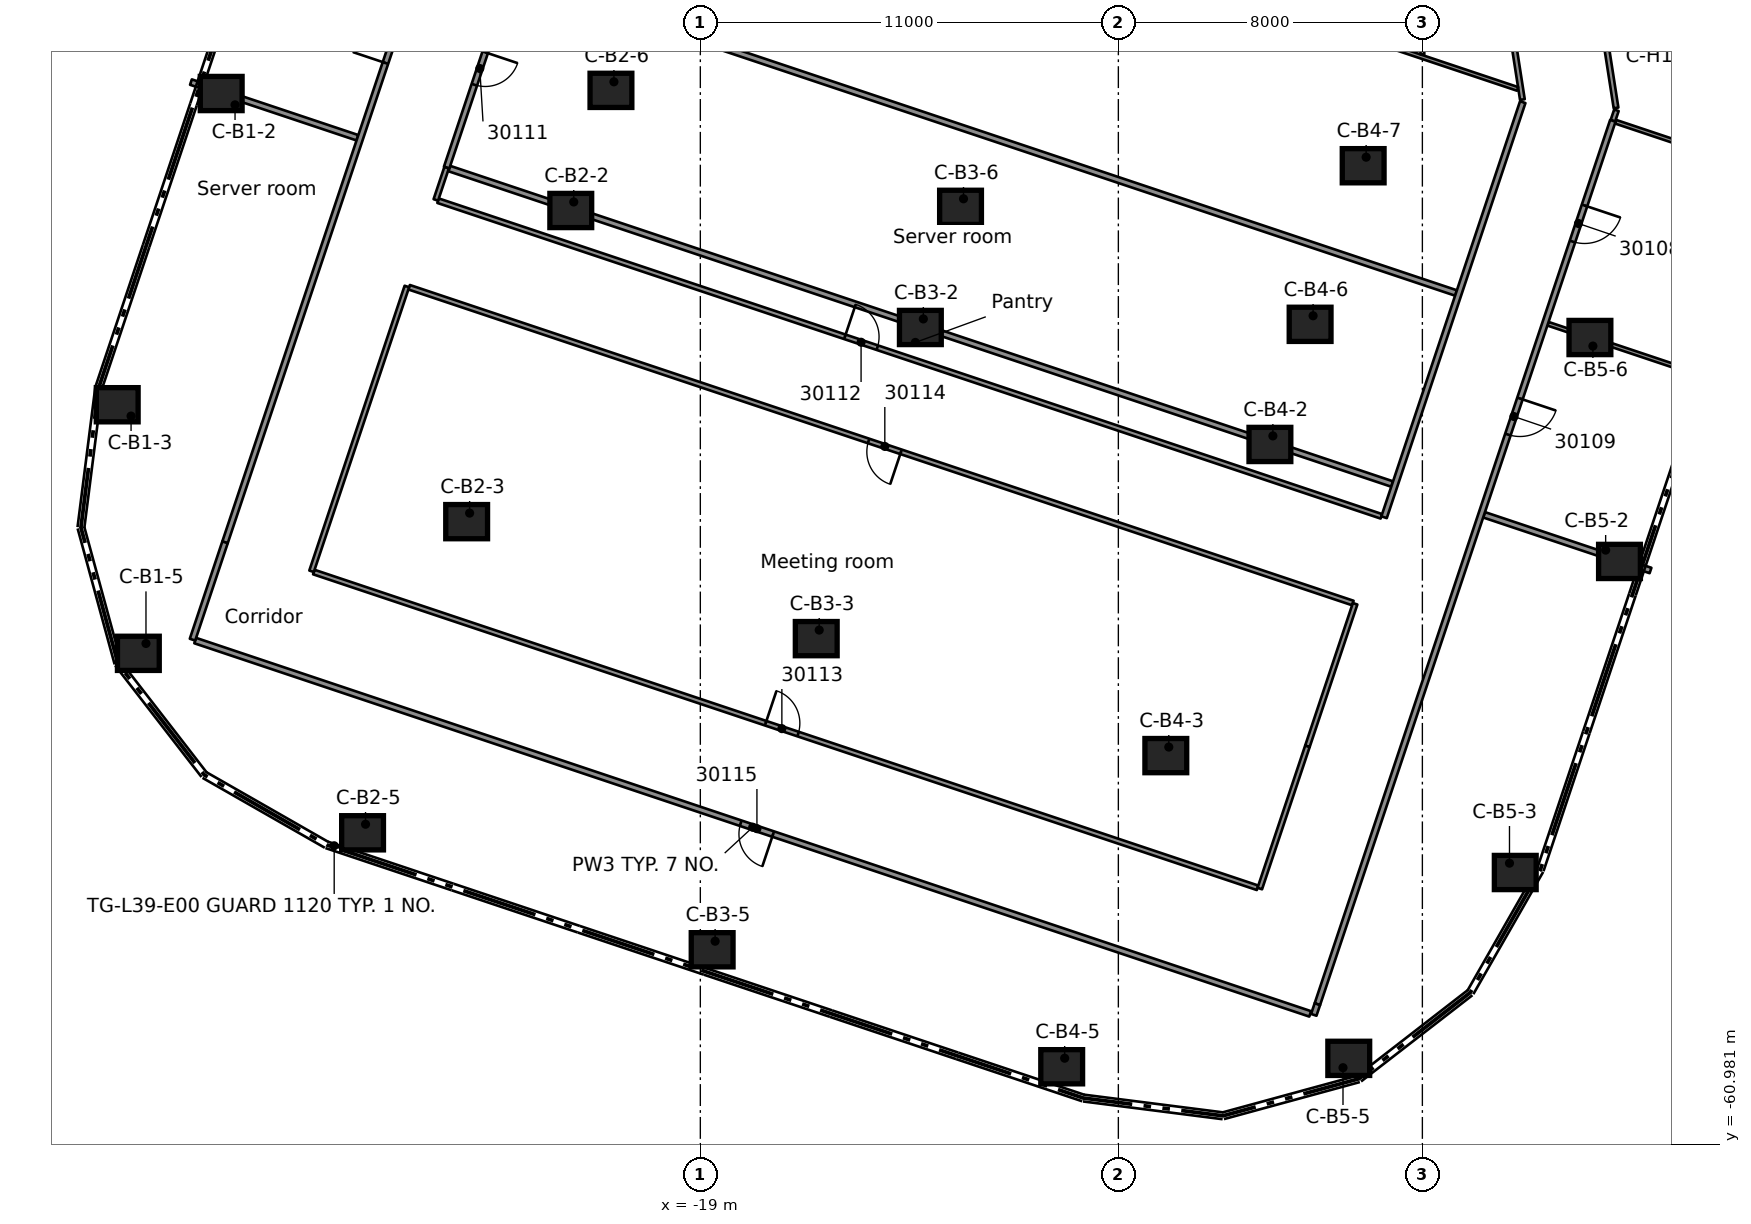
"""IFC4 building model, lengths in metres.
Left out: names, types, materials, properties, quantities, classifications, styles, units other than length and angle.
Written with IfcOpenShell. Run it as: python <this file> out.ifc"""

import sys

from ifc_helpers import new_model, si_unit, direction, frame, frame_2d, origin, origin_2d, place, context, subcontext, project, spatial, rectangle, extrude, element, fill, save


model = new_model("IFC4")
c1 = context("Model", 3, precision=1e-05, world=origin(), true_north=direction((0.0, 1.0)))
c2 = subcontext(c1, "Body", "Model", "MODEL_VIEW")
j1 = project(units=[si_unit("LENGTHUNIT", "METRE"), si_unit("PLANEANGLEUNIT", "RADIAN")], contexts=[c1])
p1 = place(None, origin())
s1 = spatial("IfcSite", under=j1, at=p1, CompositionType="ELEMENT")
p2 = place(p1, origin())
s2 = spatial("IfcBuilding", under=s1, at=p2, CompositionType="ELEMENT")
p3 = place(p2, frame((0.0, 0.0, 152.6)))
s3 = spatial("IfcBuildingStorey", under=s2, at=p3, CompositionType="ELEMENT", Elevation=152.6)
for number, where, z_axis, x_axis in (
    (1, (-31.608, -33.326, 0.0), (0.0, 0.0, 1.0), (1.0, 0.0, 0.0)),
    (2, (-34.344, -41.515, 0.0), (0.0, 0.0, 1.0), (1.0, 0.0, 0.0)),
    (3, (-33.788, -48.056, 0.0), (0.0, 0.0, 1.0), (1.0, 0.0, 0.0)),
    (4, (-22.409, -36.404, 0.0), (0.0, 0.0, 1.0), (1.0, 0.0, 0.0)),
    (5, (-25.149, -44.591, 0.0), (0.0, 0.0, 1.0), (1.0, 0.0, 0.0)),
    (6, (-27.888, -52.778, 0.0), (0.0, 0.0, 1.0), (1.0, 0.0, 0.0)),
    (7, (-21.352, -33.243, 0.0), (0.0, 0.0, 1.0), (1.0, 0.0, 0.0)),
    (8, (-13.21, -39.482, 0.0), (0.0, 0.0, 1.0), (1.0, 0.0, 0.0)),
    (9, (-15.95, -47.669, 0.0), (0.0, 0.0, 1.0), (1.0, 0.0, 0.0)),
    (10, (-18.689, -55.856, 0.0), (0.0, 0.0, 1.0), (1.0, 0.0, 0.0)),
    (11, (-12.153, -36.321, 0.0), (0.0, 0.0, 1.0), (1.0, 0.0, 0.0)),
    (12, (-4.012, -42.56, 0.0), (0.0, 0.0, 1.0), (1.0, 0.0, 0.0)),
    (13, (-6.751, -50.747, 0.0), (0.0, 0.0, 1.0), (1.0, 0.0, 0.0)),
    (14, (-9.491, -58.934, 0.0), (0.0, 0.0, 1.0), (1.0, 0.0, 0.0)),
    (15, (-2.954, -39.399, 0.0), (0.0, 0.0, 1.0), (1.0, 0.0, 0.0)),
    (16, (-1.558, -35.226, 0.0), (0.0, 0.0, 1.0), (1.0, 0.0, 0.0)),
    (17, (5.187, -45.638, 0.0), (0.0, 0.0, 1.0), (1.0, 0.0, 0.0)),
    (18, (2.444, -53.823, 0.0), (0.0, 0.0, 1.0), (1.0, 0.0, 0.0)),
    (19, (-1.937, -58.713, 0.0), (0.0, 0.0, 1.0), (1.0, 0.0, 0.0)),
    (20, (4.409, -39.746, 0.0), (0.0, 0.0, 1.0), (1.0, 0.0, 0.0)),
):
    element("IfcColumn", number, at=place(p3, frame(where, z_axis=z_axis, x_axis=x_axis)), inside=s3, PredefinedType="COLUMN", context=c2, shape_type="SweptSolid", body=[
        extrude(rectangle(XDim=1.1, YDim=0.9, at=origin_2d()), origin(), (0.0, 0.0, 1.0), 3.5),
    ])
p4 = place(p3, frame((2.632, -33.485, 0.0), z_axis=(0.0, 0.0, 1.0), x_axis=(-0.153927089286, 0.988082208717, 0.0)))
e21 = element("IfcWall", 21, at=p4, inside=s3, PredefinedType="PARTITIONING", context=c2, shape_type="SweptSolid", body=[
    extrude(rectangle(XDim=4.405, YDim=0.125, at=frame_2d((2.202, 0.0))), origin(), (0.0, 0.0, 1.0), 3.08),
])
p5 = place(p3, frame((4.394, -29.196, 0.0), z_axis=(0.0, 0.0, 1.0), x_axis=(0.153813799922, -0.9880998507, 0.0)))
e22 = element("IfcWall", 22, at=p5, inside=s3, PredefinedType="PARTITIONING", context=c2, shape_type="SweptSolid", body=[
    extrude(rectangle(XDim=4.563, YDim=0.125, at=frame_2d((2.282, 0.0))), origin(), (0.0, 0.0, 1.0), 3.08),
])
p6 = place(p3, frame((-2.952, -57.543, 0.0), z_axis=(0.0, 0.0, 1.0), x_axis=(-0.948265852258, 0.317477358942, 0.0)))
e23 = element("IfcWall", 23, at=p6, inside=s3, PredefinedType="PARTITIONING", context=c2, shape_type="SweptSolid", body=[
    extrude(rectangle(XDim=30.941, YDim=0.15, at=frame_2d((15.47, 0.0))), origin(), (0.0, 0.0, 1.0), 3.08),
])
p7 = place(p6, frame((14.903, 0.0, 0.0)))
e24 = element("IfcOpeningElement", 24, at=p7, cuts=e23, PredefinedType="OPENING", context=c2, shape_type="SweptSolid", body=[
    extrude(rectangle(XDim=0.9, YDim=2.1, at=frame_2d((0.45, 1.05))), frame((0.0, 0.085, 0.0), z_axis=(0.0, -1.0, 0.0), x_axis=(1.0, 0.0, 0.0)), (0.0, 0.0, 1.0), 0.17),
])
p8 = place(p3, frame((-29.171, -45.917, 0.0), z_axis=(0.0, 0.0, 1.0), x_axis=(0.948337781815, -0.317262433299, 0.0)))
e25 = element("IfcWall", 25, at=p8, inside=s3, PredefinedType="PARTITIONING", context=c2, shape_type="SweptSolid", body=[
    extrude(rectangle(XDim=26.187, YDim=0.125, at=frame_2d((13.093, 0.0))), origin(), (0.0, 0.0, 1.0), 3.08),
])
p9 = place(p8, frame((12.538, 0.0, 0.0)))
e26 = element("IfcOpeningElement", 26, at=p9, cuts=e25, PredefinedType="OPENING", context=c2, shape_type="SweptSolid", body=[
    extrude(rectangle(XDim=0.9, YDim=2.1, at=frame_2d((0.45, 1.05))), frame((0.0, 0.073, 0.0), z_axis=(0.0, -1.0, 0.0), x_axis=(1.0, 0.0, 0.0)), (0.0, 0.0, 1.0), 0.145),
])
p10 = place(p3, frame((-1.829, -46.732, 0.0), z_axis=(0.0, 0.0, 1.0), x_axis=(-0.948329366448, 0.317287586791, 0.0)))
e27 = element("IfcWall", 27, at=p10, inside=s3, PredefinedType="PARTITIONING", context=c2, shape_type="SweptSolid", body=[
    extrude(rectangle(XDim=26.187, YDim=0.125, at=frame_2d((13.094, 0.0))), origin(), (0.0, 0.0, 1.0), 3.08),
])
p11 = place(p10, frame((12.538, 0.0, 0.0)))
e28 = element("IfcOpeningElement", 28, at=p11, cuts=e27, PredefinedType="OPENING", context=c2, shape_type="SweptSolid", body=[
    extrude(rectangle(XDim=0.9, YDim=2.1, at=frame_2d((0.45, 1.05))), frame((0.0, 0.073, 0.0), z_axis=(0.0, -1.0, 0.0), x_axis=(1.0, 0.0, 0.0)), (0.0, 0.0, 1.0), 0.145),
])
p12 = place(p3, frame((-25.901, -36.146, 0.0), z_axis=(0.0, 0.0, 1.0), x_axis=(0.948327321089, -0.317293700025, 0.0)))
e29 = element("IfcWall", 29, at=p12, inside=s3, PredefinedType="PARTITIONING", context=c2, shape_type="SweptSolid", body=[
    extrude(rectangle(XDim=26.174, YDim=0.125, at=frame_2d((13.087, 0.0))), origin(), (0.0, 0.0, 1.0), 3.08),
])
p13 = place(p12, frame((11.288, 0.0, 0.0)))
e30 = element("IfcOpeningElement", 30, at=p13, cuts=e29, PredefinedType="OPENING", context=c2, shape_type="SweptSolid", body=[
    extrude(rectangle(XDim=0.9, YDim=2.1, at=frame_2d((0.45, 1.05))), frame((0.0, 0.073, 0.0), z_axis=(0.0, -1.0, 0.0), x_axis=(1.0, 0.0, 0.0)), (0.0, 0.0, 1.0), 0.145),
])
p14 = place(p3, frame((-32.404, -33.025, 0.0), z_axis=(0.0, 0.0, 1.0), x_axis=(0.948376327841, -0.317147191049, 0.0)))
e31 = element("IfcWall", 31, at=p14, inside=s3, PredefinedType="PARTITIONING", context=c2, shape_type="SweptSolid", body=[
    extrude(rectangle(XDim=4.62, YDim=0.15, at=frame_2d((2.31, 0.0))), origin(), (0.0, 0.0, 1.0), 3.08),
])
p15 = place(p3, frame((-25.605, -35.3, 0.0), z_axis=(0.0, 0.0, 1.0), x_axis=(0.948327152728, -0.317294203223, 0.0)))
e32 = element("IfcWall", 32, at=p15, inside=s3, PredefinedType="PARTITIONING", context=c2, shape_type="SweptSolid", body=[
    extrude(rectangle(XDim=26.162, YDim=0.15, at=frame_2d((13.081, 0.0))), origin(), (0.0, 0.0, 1.0), 3.08),
])
p16 = place(p3, frame((1.624, -44.411, 0.0), z_axis=(0.0, 0.0, 1.0), x_axis=(0.948328454315, -0.317290313021, 0.0)))
e33 = element("IfcWall", 33, at=p16, inside=s3, PredefinedType="PARTITIONING", context=c2, shape_type="SweptSolid", body=[
    extrude(rectangle(XDim=4.617, YDim=0.15, at=frame_2d((2.309, 0.0))), origin(), (0.0, 0.0, 1.0), 3.08),
])
p17 = place(p3, frame((-23.923, -30.274, 0.0), z_axis=(0.0, 0.0, 1.0), x_axis=(0.948327152728, -0.317294203223, 0.0)))
e34 = element("IfcWall", 34, at=p17, inside=s3, PredefinedType="PARTITIONING", context=c2, shape_type="SweptSolid", body=[
    extrude(rectangle(XDim=26.162, YDim=0.15, at=frame_2d((13.081, 0.0))), origin(), (0.0, 0.0, 1.0), 3.08),
])
p18 = place(p3, frame((3.306, -39.384, 0.0), z_axis=(0.0, 0.0, 1.0), x_axis=(0.948270131157, -0.317464578112, 0.0)))
e35 = element("IfcWall", 35, at=p18, inside=s3, PredefinedType="PARTITIONING", context=c2, shape_type="SweptSolid", body=[
    extrude(rectangle(XDim=4.618, YDim=0.1, at=frame_2d((2.309, 0.0))), origin(), (0.0, 0.0, 1.0), 3.08),
])
p19 = place(p3, frame((-21.98, -25.012, 0.0), z_axis=(0.0, 0.0, 1.0), x_axis=(0.948316725504, -0.31732536635, 0.0)))
e36 = element("IfcWall", 36, at=p19, inside=s3, PredefinedType="PARTITIONING", context=c2, shape_type="SweptSolid", body=[
    extrude(rectangle(XDim=25.819, YDim=0.1, at=frame_2d((12.91, 0.0))), origin(), (0.0, 0.0, 1.0), 3.08),
])
p20 = place(p3, frame((5.084, -34.068, 0.0), z_axis=(0.0, 0.0, 1.0), x_axis=(0.948370959481, -0.317163243793, 0.0)))
e37 = element("IfcWall", 37, at=p20, inside=s3, PredefinedType="PARTITIONING", context=c2, shape_type="SweptSolid", body=[
    extrude(rectangle(XDim=4.619, YDim=0.1, at=frame_2d((2.309, 0.0))), origin(), (0.0, 0.0, 1.0), 3.08),
])
p21 = place(p3, frame((-2.858, -57.568, 0.0), z_axis=(0.0, 0.0, 1.0), x_axis=(0.319888251559, 0.947455279427, 0.0)))
e38 = element("IfcWall", 38, at=p21, inside=s3, PredefinedType="PARTITIONING", context=c2, shape_type="SweptSolid", body=[
    extrude(rectangle(XDim=0.3, YDim=0.15, at=frame_2d((0.15, 0.0))), origin(), (0.0, 0.0, 1.0), 3.08),
])
p22 = place(p3, frame((5.013, -34.044, 0.0), z_axis=(0.0, 0.0, 1.0), x_axis=(0.318483843222, 0.947928289274, 0.0)))
e39 = element("IfcWall", 39, at=p22, inside=s3, PredefinedType="PARTITIONING", context=c2, shape_type="SweptSolid", body=[
    extrude(rectangle(XDim=0.292, YDim=0.125, at=frame_2d((0.146, 0.0))), origin(), (0.0, 0.0, 1.0), 3.08),
])
p23 = place(p3, frame((5.012, -34.044, 0.0), z_axis=(0.0, 0.0, 1.0), x_axis=(-0.317228830318, -0.948349022889, 0.0)))
e40 = element("IfcWall", 40, at=p23, inside=s3, PredefinedType="PARTITIONING", context=c2, shape_type="SweptSolid", body=[
    extrude(rectangle(XDim=24.506, YDim=0.15, at=frame_2d((12.253, 0.0))), origin(), (0.0, 0.0, 1.0), 3.08),
])
p24 = place(p23, frame((2.349, 0.0, 0.0)))
e41 = element("IfcOpeningElement", 41, at=p24, cuts=e40, PredefinedType="OPENING", context=c2, shape_type="SweptSolid", body=[
    extrude(rectangle(XDim=1.0, YDim=2.1, at=frame_2d((0.5, 1.05))), frame((0.0, 0.085, 0.0), z_axis=(0.0, -1.0, 0.0), x_axis=(1.0, 0.0, 0.0)), (0.0, 0.0, 1.0), 0.17),
])
p25 = place(p23, frame((7.705, 0.0, 0.0)))
e42 = element("IfcOpeningElement", 42, at=p25, cuts=e40, PredefinedType="OPENING", context=c2, shape_type="SweptSolid", body=[
    extrude(rectangle(XDim=1.0, YDim=2.1, at=frame_2d((0.5, 1.05))), frame((0.0, 0.085, 0.0), z_axis=(0.0, -1.0, 0.0), x_axis=(1.0, 0.0, 0.0)), (0.0, 0.0, 1.0), 0.17),
])
p26 = place(p3, frame((-4.278, -54.245, 0.0), z_axis=(0.0, 0.0, 1.0), x_axis=(0.317469687011, 0.94826842077, 0.0)))
e43 = element("IfcWall", 43, at=p26, inside=s3, PredefinedType="PARTITIONING", context=c2, shape_type="SweptSolid", body=[
    extrude(rectangle(XDim=3.95, YDim=0.125, at=frame_2d((1.975, 0.0))), origin(), (0.0, 0.0, 1.0), 3.08),
])
p27 = place(p3, frame((-3.024, -50.499, 0.0), z_axis=(0.0, 0.0, 1.0), x_axis=(0.317339720629, 0.94831192216, 0.0)))
e44 = element("IfcWall", 44, at=p27, inside=s3, PredefinedType="PARTITIONING", context=c2, shape_type="SweptSolid", body=[
    extrude(rectangle(XDim=3.951, YDim=0.125, at=frame_2d((1.976, 0.0))), origin(), (0.0, 0.0, 1.0), 3.08),
])
p28 = place(p3, frame((-1.008, -44.475, 0.0), z_axis=(0.0, 0.0, 1.0), x_axis=(0.316889155775, 0.948462578572, 0.0)))
e45 = element("IfcWall", 45, at=p28, inside=s3, PredefinedType="PARTITIONING", context=c2, shape_type="SweptSolid", body=[
    extrude(rectangle(XDim=11.516, YDim=0.15, at=frame_2d((5.758, 0.0))), origin(), (0.0, 0.0, 1.0), 3.08),
])
p29 = place(p3, frame((-29.23, -45.897, 0.0), z_axis=(0.0, 0.0, 1.0), x_axis=(0.317376800691, 0.948299513014, 0.0)))
e46 = element("IfcWall", 46, at=p29, inside=s3, PredefinedType="PARTITIONING", context=c2, shape_type="SweptSolid", body=[
    extrude(rectangle(XDim=7.902, YDim=0.125, at=frame_2d((3.951, 0.0))), origin(), (0.0, 0.0, 1.0), 3.08),
])
p30 = place(p3, frame((-22.307, -25.21, 0.0), z_axis=(0.0, 0.0, 1.0), x_axis=(-0.317400526235, -0.948291572221, 0.0)))
e47 = element("IfcWall", 47, at=p30, inside=s3, PredefinedType="PARTITIONING", context=c2, shape_type="SweptSolid", body=[
    extrude(rectangle(XDim=10.615, YDim=0.15, at=frame_2d((5.307, 0.0))), origin(), (0.0, 0.0, 1.0), 3.08),
])
p31 = place(p30, frame((2.101, 0.0, 0.0)))
e48 = element("IfcOpeningElement", 48, at=p31, cuts=e47, PredefinedType="OPENING", context=c2, shape_type="SweptSolid", body=[
    extrude(rectangle(XDim=0.9, YDim=2.1, at=frame_2d((0.45, 1.05))), frame((0.0, 0.085, 0.0), z_axis=(0.0, -1.0, 0.0), x_axis=(1.0, 0.0, 0.0)), (0.0, 0.0, 1.0), 0.17),
])
p32 = place(p30, frame((7.414, 0.0, 0.0)))
e49 = element("IfcOpeningElement", 49, at=p32, cuts=e47, PredefinedType="OPENING", context=c2, shape_type="SweptSolid", body=[
    extrude(rectangle(XDim=0.9, YDim=2.1, at=frame_2d((0.45, 1.05))), frame((0.0, 0.085, 0.0), z_axis=(0.0, -1.0, 0.0), x_axis=(1.0, 0.0, 0.0)), (0.0, 0.0, 1.0), 0.17),
])
p33 = place(p3, frame((-25.96, -36.126, 0.0), z_axis=(0.0, 0.0, 1.0), x_axis=(0.316799745903, 0.948492446462, 0.0)))
e50 = element("IfcWall", 50, at=p33, inside=s3, PredefinedType="PARTITIONING", context=c2, shape_type="SweptSolid", body=[
    extrude(rectangle(XDim=0.896, YDim=0.125, at=frame_2d((0.448, 0.0))), origin(), (0.0, 0.0, 1.0), 3.08),
])
p34 = place(p3, frame((-31.507, -45.135, 0.0), z_axis=(0.0, 0.0, 1.0), x_axis=(0.317398027953, 0.948292408412, 0.0)))
e51 = element("IfcWall", 51, at=p34, inside=s3, PredefinedType="PARTITIONING", context=c2, shape_type="SweptSolid", body=[
    extrude(rectangle(XDim=22.401, YDim=0.15, at=frame_2d((11.201, 0.0))), origin(), (0.0, 0.0, 1.0), 3.08),
])
p35 = place(p34, frame((18.85, 0.0, 0.0)))
e52 = element("IfcOpeningElement", 52, at=p35, cuts=e51, PredefinedType="OPENING", context=c2, shape_type="SweptSolid", body=[
    extrude(rectangle(XDim=0.9, YDim=2.1, at=frame_2d((0.45, 1.05))), frame((0.0, 0.085, 0.0), z_axis=(0.0, -1.0, 0.0), x_axis=(1.0, 0.0, 0.0)), (0.0, 0.0, 1.0), 0.17),
])
p36 = place(p34, frame((13.3, 0.0, 0.0)))
e53 = element("IfcOpeningElement", 53, at=p36, cuts=e51, PredefinedType="OPENING", context=c2, shape_type="SweptSolid", body=[
    extrude(rectangle(XDim=0.9, YDim=2.1, at=frame_2d((0.45, 1.05))), frame((0.0, 0.085, 0.0), z_axis=(0.0, -1.0, 0.0), x_axis=(1.0, 0.0, 0.0)), (0.0, 0.0, 1.0), 0.17),
])
p37 = place(p3, frame((-31.507, -45.135, 0.0), z_axis=(0.0, 0.0, 1.0), x_axis=(-0.316987131858, -0.948429838331, 0.0)))
e54 = element("IfcWall", 54, at=p37, inside=s3, PredefinedType="PARTITIONING", context=c2, shape_type="SweptSolid", body=[
    extrude(rectangle(XDim=2.7, YDim=0.15, at=frame_2d((1.35, 0.0))), origin(), (0.0, 0.0, 1.0), 3.08),
])
p38 = place(p3, frame((0.0, -32.297, 0.0), z_axis=(0.0, 0.0, 1.0), x_axis=(0.0, 1.0, 0.0)))
e55 = element("IfcWall", 55, at=p38, inside=s3, PredefinedType="PARTITIONING", context=c2, shape_type="SweptSolid", body=[
    extrude(rectangle(XDim=17.235, YDim=0.1, at=frame_2d((8.618, 0.0))), origin(), (0.0, 0.0, 1.0), 3.08),
])
p39 = place(p24, origin())
e56 = element("IfcDoor", 56, at=p39, inside=s3, OperationType="SINGLE_SWING_LEFT", PredefinedType="DOOR", context=c2, shape_type="SweptSolid", body=[
    extrude(rectangle(XDim=1.0, YDim=2.1, at=frame_2d((0.5, 1.05))), frame((0.0, 0.025, 0.0), z_axis=(0.0, -1.0, 0.0), x_axis=(1.0, 0.0, 0.0)), (0.0, 0.0, 1.0), 0.05),
])
fill(e41, e56)
p40 = place(p25, origin())
e57 = element("IfcDoor", 57, at=p40, inside=s3, OperationType="SINGLE_SWING_LEFT", PredefinedType="DOOR", context=c2, shape_type="SweptSolid", body=[
    extrude(rectangle(XDim=1.0, YDim=2.1, at=frame_2d((0.5, 1.05))), frame((0.0, 0.025, 0.0), z_axis=(0.0, -1.0, 0.0), x_axis=(1.0, 0.0, 0.0)), (0.0, 0.0, 1.0), 0.05),
])
fill(e42, e57)
p41 = place(p32, origin())
e58 = element("IfcDoor", 58, at=p41, inside=s3, OperationType="SINGLE_SWING_RIGHT", PredefinedType="DOOR", context=c2, shape_type="SweptSolid", body=[
    extrude(rectangle(XDim=0.9, YDim=2.1, at=frame_2d((0.45, 1.05))), frame((0.0, 0.025, 0.0), z_axis=(0.0, -1.0, 0.0), x_axis=(1.0, 0.0, 0.0)), (0.0, 0.0, 1.0), 0.05),
])
fill(e49, e58)
p42 = place(p13, origin())
e59 = element("IfcDoor", 59, at=p42, inside=s3, OperationType="SINGLE_SWING_LEFT", PredefinedType="DOOR", context=c2, shape_type="SweptSolid", body=[
    extrude(rectangle(XDim=0.9, YDim=2.1, at=frame_2d((0.45, 1.05))), frame((0.0, 0.025, 0.0), z_axis=(0.0, -1.0, 0.0), x_axis=(1.0, 0.0, 0.0)), (0.0, 0.0, 1.0), 0.05),
])
fill(e30, e59)
p43 = place(p9, origin())
e60 = element("IfcDoor", 60, at=p43, inside=s3, OperationType="SINGLE_SWING_LEFT", PredefinedType="DOOR", context=c2, shape_type="SweptSolid", body=[
    extrude(rectangle(XDim=0.9, YDim=2.1, at=frame_2d((0.45, 1.05))), frame((0.0, 0.025, 0.0), z_axis=(0.0, -1.0, 0.0), x_axis=(1.0, 0.0, 0.0)), (0.0, 0.0, 1.0), 0.05),
])
fill(e26, e60)
p44 = place(p11, origin())
e61 = element("IfcDoor", 61, at=p44, inside=s3, OperationType="SINGLE_SWING_LEFT", PredefinedType="DOOR", context=c2, shape_type="SweptSolid", body=[
    extrude(rectangle(XDim=0.9, YDim=2.1, at=frame_2d((0.45, 1.05))), frame((0.0, 0.025, 0.0), z_axis=(0.0, -1.0, 0.0), x_axis=(1.0, 0.0, 0.0)), (0.0, 0.0, 1.0), 0.05),
])
fill(e28, e61)
p45 = place(p7, origin())
e62 = element("IfcDoor", 62, at=p45, inside=s3, OperationType="SINGLE_SWING_LEFT", PredefinedType="DOOR", context=c2, shape_type="SweptSolid", body=[
    extrude(rectangle(XDim=0.9, YDim=2.1, at=frame_2d((0.45, 1.05))), frame((0.0, 0.025, 0.0), z_axis=(0.0, -1.0, 0.0), x_axis=(1.0, 0.0, 0.0)), (0.0, 0.0, 1.0), 0.05),
])
fill(e24, e62)
p46 = place(p36, origin())
e63 = element("IfcDoor", 63, at=p46, inside=s3, OperationType="SINGLE_SWING_RIGHT", PredefinedType="DOOR", context=c2, shape_type="SweptSolid", body=[
    extrude(rectangle(XDim=0.9, YDim=2.1, at=frame_2d((0.45, 1.05))), frame((0.0, 0.025, 0.0), z_axis=(0.0, -1.0, 0.0), x_axis=(1.0, 0.0, 0.0)), (0.0, 0.0, 1.0), 0.05),
])
fill(e53, e63)
save(model, sys.argv[1])
